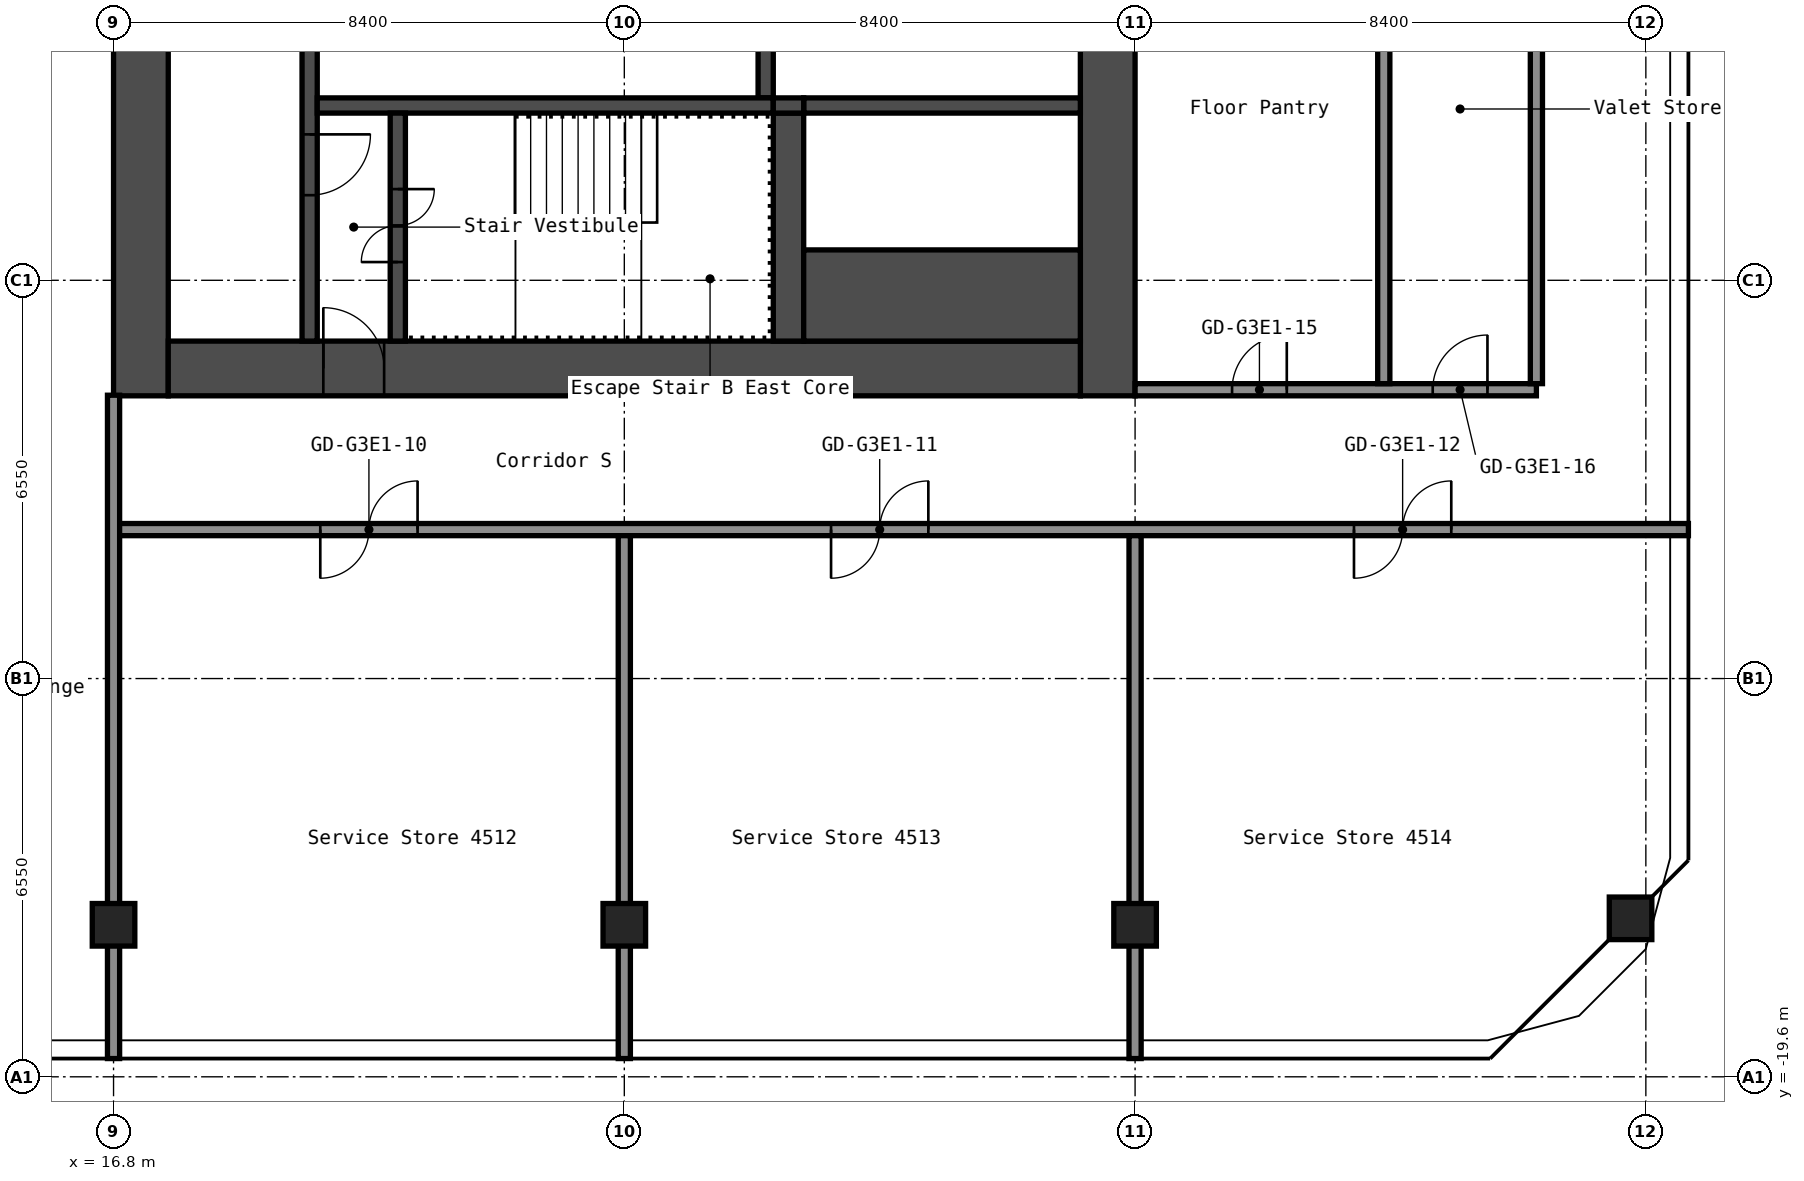
"""IFC4 building model, lengths in metres.
Left out: names, types, materials, properties, quantities, classifications, styles, units other than length and angle.
Written with IfcOpenShell. Run it as: python <this file> out.ifc"""

import sys

from ifc_helpers import new_model, si_unit, direction, frame, frame_2d, origin, origin_2d, place, context, subcontext, project, spatial, rectangle, hollow_rectangle, extrude, element, fill, save


model = new_model("IFC4")
c1 = context("Model", 3, precision=1e-05, world=origin(), true_north=direction((0.0, 1.0)))
c2 = subcontext(c1, "Body", "Model", "MODEL_VIEW")
j1 = project(units=[si_unit("LENGTHUNIT", "METRE"), si_unit("PLANEANGLEUNIT", "RADIAN")], contexts=[c1])
p1 = place(None, origin())
s1 = spatial("IfcSite", under=j1, at=p1, CompositionType="ELEMENT")
p2 = place(p1, origin())
s2 = spatial("IfcBuilding", under=s1, at=p2, CompositionType="ELEMENT")
p3 = place(p2, frame((0.0, 0.0, 159.8)))
s3 = spatial("IfcBuildingStorey", under=s2, at=p3, CompositionType="ELEMENT", Elevation=159.8)
for number, where, z_axis, x_axis in (
    (1, (16.8, -17.1, 0.0), (0.0, 0.0, 1.0), (1.0, 0.0, 0.0)),
    (2, (25.2, -17.1, 0.0), (0.0, 0.0, 1.0), (1.0, 0.0, 0.0)),
    (3, (33.6, -17.1, 0.0), (0.0, 0.0, 1.0), (1.0, 0.0, 0.0)),
    (4, (41.749, -16.994, 0.0), (0.0, 0.0, 1.0), (1.0, 0.0, 0.0)),
):
    element("IfcColumn", number, at=place(p3, frame(where, z_axis=z_axis, x_axis=x_axis)), inside=s3, PredefinedType="COLUMN", context=c2, shape_type="SweptSolid", body=[
        extrude(hollow_rectangle(XDim=0.7, YDim=0.7, WallThickness=0.028, at=origin_2d()), origin(), (0.0, 0.0, 1.0), 2.75),
    ])
p4 = place(p3, frame((17.25, -8.4, 0.0), z_axis=(0.0, 0.0, 1.0), x_axis=(0.0, 1.0, 0.0)))
e5 = element("IfcWall", 5, at=p4, inside=s3, PredefinedType="SHEAR", context=c2, shape_type="SweptSolid", body=[
    extrude(rectangle(XDim=16.8, YDim=0.9, at=frame_2d((8.4, 0.0))), origin(), (0.0, 0.0, 1.0), 2.75),
])
p5 = place(p4, frame((7.1, 0.0, 0.0)))
e6 = element("IfcOpeningElement", 6, at=p5, cuts=e5, PredefinedType="OPENING", context=c2, shape_type="SweptSolid", body=[
    extrude(rectangle(XDim=1.6, YDim=2.1, at=frame_2d((0.8, 1.05))), frame((0.0, 0.46, 0.0), z_axis=(0.0, -1.0, 0.0), x_axis=(1.0, 0.0, 0.0)), (0.0, 0.0, 1.0), 0.92),
])
p6 = place(p3, frame((33.15, -8.4, 0.0), z_axis=(0.0, 0.0, 1.0), x_axis=(0.0, 1.0, 0.0)))
e7 = element("IfcWall", 7, at=p6, inside=s3, PredefinedType="SHEAR", context=c2, shape_type="SweptSolid", body=[
    extrude(rectangle(XDim=16.8, YDim=0.9, at=frame_2d((8.4, 0.0))), origin(), (0.0, 0.0, 1.0), 2.75),
])
p7 = place(p3, frame((17.7, -7.95, 0.0), z_axis=(0.0, 0.0, 1.0), x_axis=(1.0, 0.0, 0.0)))
e8 = element("IfcWall", 8, at=p7, inside=s3, PredefinedType="SHEAR", context=c2, shape_type="SweptSolid", body=[
    extrude(rectangle(XDim=15.0, YDim=0.9, at=frame_2d((7.5, 0.0))), origin(), (0.0, 0.0, 1.0), 2.75),
])
p8 = place(p7, frame((2.55, 0.0, 0.0)))
e9 = element("IfcOpeningElement", 9, at=p8, cuts=e8, PredefinedType="OPENING", context=c2, shape_type="SweptSolid", body=[
    extrude(rectangle(XDim=1.0, YDim=2.1, at=frame_2d((0.5, 1.05))), frame((0.0, 0.46, 0.0), z_axis=(0.0, -1.0, 0.0), x_axis=(1.0, 0.0, 0.0)), (0.0, 0.0, 1.0), 0.92),
])
p9 = place(p3, frame((20.025, -7.5, 0.0), z_axis=(0.0, 0.0, 1.0), x_axis=(0.0, 1.0, 0.0)))
e10 = element("IfcWall", 10, at=p9, inside=s3, PredefinedType="SHEAR", context=c2, shape_type="SweptSolid", body=[
    extrude(rectangle(XDim=6.3, YDim=0.25, at=frame_2d((3.15, 0.0))), origin(), (0.0, 0.0, 1.0), 2.75),
])
p10 = place(p9, frame((2.4, 0.0, 0.0)))
e11 = element("IfcOpeningElement", 11, at=p10, cuts=e10, PredefinedType="OPENING", context=c2, shape_type="SweptSolid", body=[
    extrude(rectangle(XDim=1.0, YDim=2.1, at=frame_2d((0.5, 1.05))), frame((0.0, 0.135, 0.0), z_axis=(0.0, -1.0, 0.0), x_axis=(1.0, 0.0, 0.0)), (0.0, 0.0, 1.0), 0.27),
])
p11 = place(p3, frame((27.525, -3.5, 0.0), z_axis=(0.0, 0.0, 1.0), x_axis=(0.0, 1.0, 0.0)))
e12 = element("IfcWall", 12, at=p11, inside=s3, PredefinedType="SHEAR", context=c2, shape_type="SweptSolid", body=[
    extrude(rectangle(XDim=2.05, YDim=0.25, at=frame_2d((1.025, 0.0))), origin(), (0.0, 0.0, 1.0), 2.75),
])
p12 = place(p3, frame((20.15, -3.625, 0.0), z_axis=(0.0, 0.0, 1.0), x_axis=(1.0, 0.0, 0.0)))
e13 = element("IfcWall", 13, at=p12, inside=s3, PredefinedType="SHEAR", context=c2, shape_type="SweptSolid", body=[
    extrude(rectangle(XDim=7.5, YDim=0.25, at=frame_2d((3.75, 0.0))), origin(), (0.0, 0.0, 1.0), 2.75),
])
p13 = place(p3, frame((21.475, -7.5, 0.0), z_axis=(0.0, 0.0, 1.0), x_axis=(0.0, 1.0, 0.0)))
e14 = element("IfcWall", 14, at=p13, inside=s3, PredefinedType="SHEAR", context=c2, shape_type="SweptSolid", body=[
    extrude(rectangle(XDim=3.75, YDim=0.25, at=frame_2d((1.875, 0.0))), origin(), (0.0, 0.0, 1.0), 2.75),
])
p14 = place(p13, frame((1.3, 0.0, 0.0)))
e15 = element("IfcOpeningElement", 15, at=p14, cuts=e14, PredefinedType="OPENING", context=c2, shape_type="SweptSolid", body=[
    extrude(rectangle(XDim=1.2, YDim=2.1, at=frame_2d((0.6, 1.05))), frame((0.0, 0.135, 0.0), z_axis=(0.0, -1.0, 0.0), x_axis=(1.0, 0.0, 0.0)), (0.0, 0.0, 1.0), 0.27),
])
p15 = place(p3, frame((27.9, -7.5, 0.0), z_axis=(0.0, 0.0, 1.0), x_axis=(0.0, 1.0, 0.0)))
e16 = element("IfcWall", 16, at=p15, inside=s3, PredefinedType="SHEAR", context=c2, shape_type="SweptSolid", body=[
    extrude(rectangle(XDim=3.75, YDim=0.5, at=frame_2d((1.875, 0.0))), origin(), (0.0, 0.0, 1.0), 2.75),
])
p16 = place(p3, frame((28.15, -3.625, 0.0), z_axis=(0.0, 0.0, 1.0), x_axis=(1.0, 0.0, 0.0)))
e17 = element("IfcWall", 17, at=p16, inside=s3, PredefinedType="SHEAR", context=c2, shape_type="SweptSolid", body=[
    extrude(rectangle(XDim=4.55, YDim=0.25, at=frame_2d((2.275, 0.0))), origin(), (0.0, 0.0, 1.0), 2.75),
])
p17 = place(p3, frame((28.15, -6.75, 0.0), z_axis=(0.0, 0.0, 1.0), x_axis=(1.0, 0.0, 0.0)))
e18 = element("IfcWall", 18, at=p17, inside=s3, PredefinedType="SHEAR", context=c2, shape_type="SweptSolid", body=[
    extrude(rectangle(XDim=4.55, YDim=1.5, at=frame_2d((2.275, 0.0))), origin(), (0.0, 0.0, 1.0), 2.75),
])
p18 = place(p3, frame((27.65, -3.625, 0.0), z_axis=(0.0, 0.0, 1.0), x_axis=(1.0, 0.0, 0.0)))
e19 = element("IfcWall", 19, at=p18, inside=s3, PredefinedType="SHEAR", context=c2, shape_type="SweptSolid", body=[
    extrude(rectangle(XDim=0.5, YDim=0.25, at=frame_2d((0.25, 0.0))), origin(), (0.0, 0.0, 1.0), 2.75),
])
p19 = place(p3, frame((16.8, -10.6, 0.0), z_axis=(0.0, 0.0, 1.0), x_axis=(1.0, 0.0, 0.0)))
e20 = element("IfcWall", 20, at=p19, inside=s3, PredefinedType="PARTITIONING", context=c2, shape_type="SweptSolid", body=[
    extrude(rectangle(XDim=25.9, YDim=0.2, at=frame_2d((12.95, 0.0))), origin(), (0.0, 0.0, 1.0), 2.75),
])
p20 = place(p19, frame((3.4, 0.0, 0.0)))
e21 = element("IfcOpeningElement", 21, at=p20, cuts=e20, PredefinedType="OPENING", context=c2, shape_type="SweptSolid", body=[
    extrude(rectangle(XDim=1.6, YDim=2.1, at=frame_2d((0.8, 1.05))), frame((0.0, 0.11, 0.0), z_axis=(0.0, -1.0, 0.0), x_axis=(1.0, 0.0, 0.0)), (0.0, 0.0, 1.0), 0.22),
])
p21 = place(p19, frame((11.8, 0.0, 0.0)))
e22 = element("IfcOpeningElement", 22, at=p21, cuts=e20, PredefinedType="OPENING", context=c2, shape_type="SweptSolid", body=[
    extrude(rectangle(XDim=1.6, YDim=2.1, at=frame_2d((0.8, 1.05))), frame((0.0, 0.11, 0.0), z_axis=(0.0, -1.0, 0.0), x_axis=(1.0, 0.0, 0.0)), (0.0, 0.0, 1.0), 0.22),
])
p22 = place(p19, frame((20.4, 0.0, 0.0)))
e23 = element("IfcOpeningElement", 23, at=p22, cuts=e20, PredefinedType="OPENING", context=c2, shape_type="SweptSolid", body=[
    extrude(rectangle(XDim=1.6, YDim=2.1, at=frame_2d((0.8, 1.05))), frame((0.0, 0.11, 0.0), z_axis=(0.0, -1.0, 0.0), x_axis=(1.0, 0.0, 0.0)), (0.0, 0.0, 1.0), 0.22),
])
p23 = place(p3, frame((33.6, -8.3, 0.0), z_axis=(0.0, 0.0, 1.0), x_axis=(1.0, 0.0, 0.0)))
e24 = element("IfcWall", 24, at=p23, inside=s3, PredefinedType="PARTITIONING", context=c2, shape_type="SweptSolid", body=[
    extrude(rectangle(XDim=6.6, YDim=0.2, at=frame_2d((3.3, 0.0))), origin(), (0.0, 0.0, 1.0), 2.75),
])
p24 = place(p23, frame((1.595, 0.0, 0.0)))
e25 = element("IfcOpeningElement", 25, at=p24, cuts=e24, PredefinedType="OPENING", context=c2, shape_type="SweptSolid", body=[
    extrude(rectangle(XDim=0.9, YDim=2.1, at=frame_2d((0.45, 1.05))), frame((0.0, 0.11, 0.0), z_axis=(0.0, -1.0, 0.0), x_axis=(1.0, 0.0, 0.0)), (0.0, 0.0, 1.0), 0.22),
])
p25 = place(p23, frame((4.895, 0.0, 0.0)))
e26 = element("IfcOpeningElement", 26, at=p25, cuts=e24, PredefinedType="OPENING", context=c2, shape_type="SweptSolid", body=[
    extrude(rectangle(XDim=0.9, YDim=2.1, at=frame_2d((0.45, 1.05))), frame((0.0, 0.11, 0.0), z_axis=(0.0, -1.0, 0.0), x_axis=(1.0, 0.0, 0.0)), (0.0, 0.0, 1.0), 0.22),
])
p26 = place(p3, frame((16.8, -19.3, 0.0), z_axis=(0.0, 0.0, 1.0), x_axis=(0.0, 1.0, 0.0)))
e27 = element("IfcWall", 27, at=p26, inside=s3, PredefinedType="PARTITIONING", context=c2, shape_type="SweptSolid", body=[
    extrude(rectangle(XDim=10.91, YDim=0.2, at=frame_2d((5.455, 0.0))), origin(), (0.0, 0.0, 1.0), 2.75),
])
for number, where, z_axis, x_axis in (
    (28, (25.2, -19.3, 0.0), (0.0, 0.0, 1.0), (0.0, 1.0, 0.0)),
    (29, (33.6, -19.3, 0.0), (0.0, 0.0, 1.0), (0.0, 1.0, 0.0)),
):
    element("IfcWall", number, at=place(p3, frame(where, z_axis=z_axis, x_axis=x_axis)), inside=s3, PredefinedType="PARTITIONING", context=c2, shape_type="SweptSolid", body=[
        extrude(rectangle(XDim=8.6, YDim=0.2, at=frame_2d((4.3, 0.0))), origin(), (0.0, 0.0, 1.0), 2.75),
    ])
p27 = place(p3, frame((37.69, -8.2, 0.0), z_axis=(0.0, 0.0, 1.0), x_axis=(0.0, 1.0, 0.0)))
e30 = element("IfcWall", 30, at=p27, inside=s3, PredefinedType="PARTITIONING", context=c2, shape_type="SweptSolid", body=[
    extrude(rectangle(XDim=8.2, YDim=0.2, at=frame_2d((4.1, 0.0))), origin(), (0.0, 0.0, 1.0), 2.75),
])
p28 = place(p3, frame((40.2, -8.2, 0.0), z_axis=(0.0, 0.0, 1.0), x_axis=(0.0, 1.0, 0.0)))
e31 = element("IfcWall", 31, at=p28, inside=s3, PredefinedType="PARTITIONING", context=c2, shape_type="SweptSolid", body=[
    extrude(rectangle(XDim=16.4, YDim=0.2, at=frame_2d((8.2, 0.0))), origin(), (0.0, 0.0, 1.0), 2.75),
])
p29 = place(p8, origin())
e32 = element("IfcDoor", 32, at=p29, inside=s3, OperationType="SINGLE_SWING_RIGHT", PredefinedType="DOOR", context=c2, shape_type="SweptSolid", body=[
    extrude(rectangle(XDim=1.0, YDim=2.1, at=frame_2d((0.5, 1.05))), frame((0.0, 0.025, 0.0), z_axis=(0.0, -1.0, 0.0), x_axis=(1.0, 0.0, 0.0)), (0.0, 0.0, 1.0), 0.05),
])
fill(e9, e32)
p30 = place(p14, origin())
e33 = element("IfcDoor", 33, at=p30, inside=s3, OperationType="DOUBLE_DOOR_SINGLE_SWING", PredefinedType="DOOR", context=c2, shape_type="SweptSolid", body=[
    extrude(rectangle(XDim=1.2, YDim=2.1, at=frame_2d((0.6, 1.05))), frame((0.0, 0.025, 0.0), z_axis=(0.0, -1.0, 0.0), x_axis=(1.0, 0.0, 0.0)), (0.0, 0.0, 1.0), 0.05),
])
fill(e15, e33)
p31 = place(p10, origin())
e34 = element("IfcDoor", 34, at=p31, inside=s3, OperationType="SINGLE_SWING_RIGHT", PredefinedType="DOOR", context=c2, shape_type="SweptSolid", body=[
    extrude(rectangle(XDim=1.0, YDim=2.1, at=frame_2d((0.5, 1.05))), frame((0.0, 0.025, 0.0), z_axis=(0.0, -1.0, 0.0), x_axis=(1.0, 0.0, 0.0)), (0.0, 0.0, 1.0), 0.05),
])
fill(e11, e34)
p32 = place(p20, origin())
e35 = element("IfcDoor", 35, at=p32, inside=s3, OperationType="DOUBLE_DOOR_SINGLE_SWING", PredefinedType="DOOR", context=c2, shape_type="SweptSolid", body=[
    extrude(rectangle(XDim=1.6, YDim=2.1, at=frame_2d((0.8, 1.05))), frame((0.0, 0.025, 0.0), z_axis=(0.0, -1.0, 0.0), x_axis=(1.0, 0.0, 0.0)), (0.0, 0.0, 1.0), 0.05),
])
fill(e21, e35)
p33 = place(p21, origin())
e36 = element("IfcDoor", 36, at=p33, inside=s3, OperationType="DOUBLE_DOOR_SINGLE_SWING", PredefinedType="DOOR", context=c2, shape_type="SweptSolid", body=[
    extrude(rectangle(XDim=1.6, YDim=2.1, at=frame_2d((0.8, 1.05))), frame((0.0, 0.025, 0.0), z_axis=(0.0, -1.0, 0.0), x_axis=(1.0, 0.0, 0.0)), (0.0, 0.0, 1.0), 0.05),
])
fill(e22, e36)
p34 = place(p22, origin())
e37 = element("IfcDoor", 37, at=p34, inside=s3, OperationType="DOUBLE_DOOR_SINGLE_SWING", PredefinedType="DOOR", context=c2, shape_type="SweptSolid", body=[
    extrude(rectangle(XDim=1.6, YDim=2.1, at=frame_2d((0.8, 1.05))), frame((0.0, 0.025, 0.0), z_axis=(0.0, -1.0, 0.0), x_axis=(1.0, 0.0, 0.0)), (0.0, 0.0, 1.0), 0.05),
])
fill(e23, e37)
p35 = place(p24, origin())
e38 = element("IfcDoor", 38, at=p35, inside=s3, OperationType="SINGLE_SWING_LEFT", PredefinedType="DOOR", context=c2, shape_type="SweptSolid", body=[
    extrude(rectangle(XDim=0.9, YDim=2.1, at=frame_2d((0.45, 1.05))), frame((0.0, 0.025, 0.0), z_axis=(0.0, -1.0, 0.0), x_axis=(1.0, 0.0, 0.0)), (0.0, 0.0, 1.0), 0.05),
])
fill(e25, e38)
p36 = place(p25, origin())
e39 = element("IfcDoor", 39, at=p36, inside=s3, OperationType="SINGLE_SWING_LEFT", PredefinedType="DOOR", context=c2, shape_type="SweptSolid", body=[
    extrude(rectangle(XDim=0.9, YDim=2.1, at=frame_2d((0.45, 1.05))), frame((0.0, 0.025, 0.0), z_axis=(0.0, -1.0, 0.0), x_axis=(1.0, 0.0, 0.0)), (0.0, 0.0, 1.0), 0.05),
])
fill(e26, e39)
save(model, sys.argv[1])
